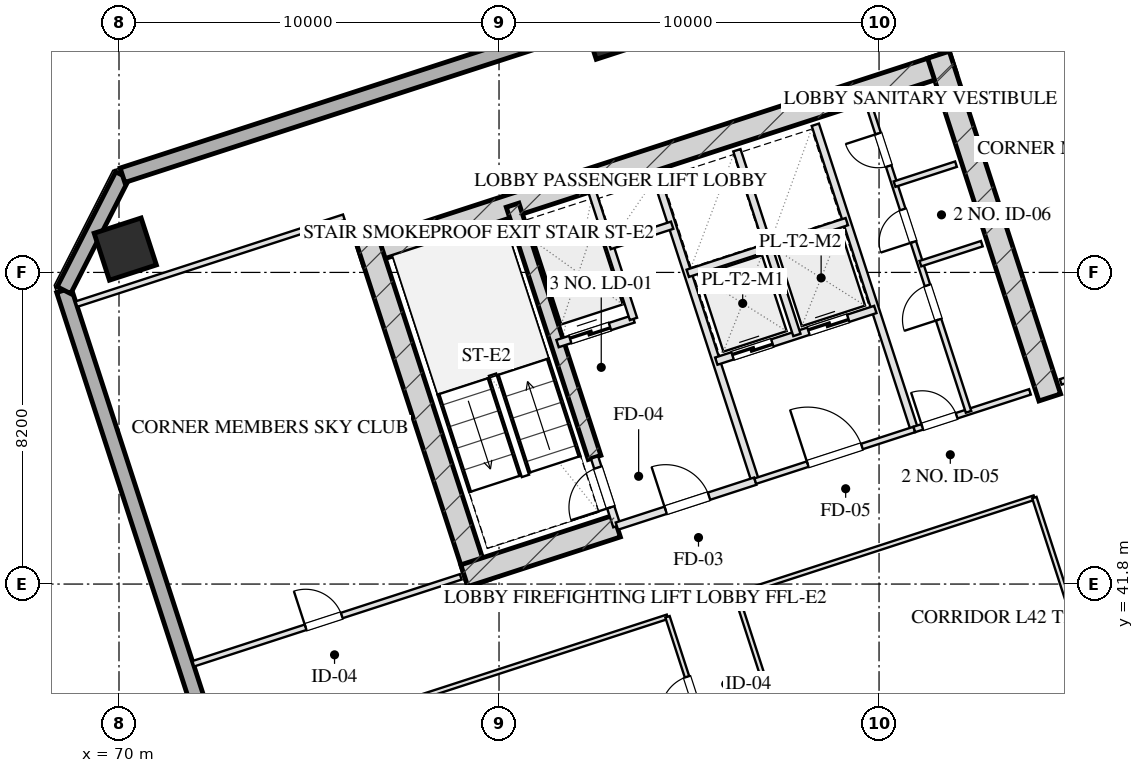
"""IFC4 building model, lengths in metres.
Left out: names, types, materials, properties, quantities, classifications, styles, units other than length and angle.
Written with IfcOpenShell. Run it as: python <this file> out.ifc"""

import sys

from ifc_helpers import new_model, si_unit, direction, frame, frame_2d, origin, origin_2d, place, context, subcontext, project, spatial, rectangle, hollow_rectangle, extrude, element, fill, save


model = new_model("IFC4")
c1 = context("Model", 3, precision=1e-05, world=origin(), true_north=direction((0.0, 1.0)))
c2 = subcontext(c1, "Body", "Model", "MODEL_VIEW")
j1 = project(units=[si_unit("LENGTHUNIT", "METRE"), si_unit("PLANEANGLEUNIT", "RADIAN")], contexts=[c1])
p1 = place(None, origin())
s1 = spatial("IfcSite", under=j1, at=p1, CompositionType="ELEMENT")
p2 = place(p1, origin())
s2 = spatial("IfcBuilding", under=s1, at=p2, CompositionType="ELEMENT")
p3 = place(p2, frame((0.0, 0.0, 159.85)))
s3 = spatial("IfcBuildingStorey", under=s2, at=p3, CompositionType="ELEMENT", Elevation=159.85)
p4 = place(p3, frame((76.344, 50.466, 0.0), z_axis=(0.0, 0.0, 1.0), x_axis=(0.951055727519, 0.309019421968, 0.0)))
e1 = element("IfcWall", 1, at=p4, inside=s3, PredefinedType="SHEAR", context=c2, shape_type="SweptSolid", body=[
    extrude(rectangle(XDim=16.4, YDim=0.6, at=frame_2d((8.2, 0.0))), origin(), (0.0, 0.0, 1.0), 3.45),
])
for number, where, z_axis, x_axis in (
    (2, (79.466, 41.828, 0.0), (0.0, 0.0, 1.0), (-0.309, 0.951, 0.0)),
    (3, (94.492, 46.71, 0.0), (0.0, 0.0, 1.0), (-0.309, 0.951, 0.0)),
):
    element("IfcWall", number, at=place(p3, frame(where, z_axis=z_axis, x_axis=x_axis)), inside=s3, PredefinedType="SHEAR", context=c2, shape_type="SweptSolid", body=[
        extrude(rectangle(XDim=9.48, YDim=0.6, at=frame_2d((4.74, 0.0))), origin(), (0.0, 0.0, 1.0), 3.45),
    ])
p5 = place(p3, frame((82.514, 45.131, 0.0), z_axis=(0.0, 0.0, 1.0), x_axis=(-0.308988790936, 0.951065679686, 0.0)))
e4 = element("IfcWall", 4, at=p5, inside=s3, PredefinedType="SHEAR", context=c2, shape_type="SweptSolid", body=[
    extrude(rectangle(XDim=6.98, YDim=0.35, at=frame_2d((3.49, 0.0))), origin(), (0.0, 0.0, 1.0), 3.45),
])
p6 = place(p3, frame((79.087, 42.021, 0.0), z_axis=(0.0, 0.0, 1.0), x_axis=(0.951062550203, 0.3089984233, 0.0)))
e5 = element("IfcWall", 5, at=p6, inside=s3, PredefinedType="SHEAR", context=c2, shape_type="SweptSolid", body=[
    extrude(rectangle(XDim=4.22, YDim=0.6, at=frame_2d((2.11, 0.0))), origin(), (0.0, 0.0, 1.0), 3.45),
])
p7 = place(p3, frame((70.165, 50.614, 0.0), z_axis=(0.0, 0.0, 1.0), x_axis=(0.951056516295, 0.309016994375, 0.0)))
e6 = element("IfcColumn", 6, at=p7, inside=s3, PredefinedType="COLUMN", context=c2, shape_type="SweptSolid", body=[
    extrude(hollow_rectangle(XDim=1.3, YDim=1.3, WallThickness=0.045, at=origin_2d()), origin(), (0.0, 0.0, 1.0), 3.451),
])
p8 = place(p3, frame((82.815, 56.112, 0.0), z_axis=(0.0, 0.0, 1.0), x_axis=(0.951056516295, 0.309016994375, 0.0)))
e7 = element("IfcColumn", 7, at=p8, inside=s3, PredefinedType="COLUMN", context=c2, shape_type="SweptSolid", body=[
    extrude(hollow_rectangle(XDim=0.8, YDim=0.8, WallThickness=0.028, at=origin_2d()), origin(), (0.0, 0.0, 1.0), 3.451),
])
p9 = place(p3, frame((81.776, 8.827, 0.0), z_axis=(0.0, 0.0, 1.0), x_axis=(-0.309014228706, 0.951057414911, 0.0)))
e8 = element("IfcWall", 8, at=p9, inside=s3, PredefinedType="SOLIDWALL", context=c2, shape_type="SweptSolid", body=[
    extrude(rectangle(XDim=42.8, YDim=0.4, at=frame_2d((21.4, 0.0))), origin(), (0.0, 0.0, 1.0), 2.61),
])
p10 = place(p9, frame((13.875, 0.0, 0.75)))
e9 = element("IfcOpeningElement", 9, at=p10, cuts=e8, PredefinedType="OPENING", context=c2, shape_type="SweptSolid", body=[
    extrude(rectangle(XDim=2.25, YDim=1.46, at=frame_2d((1.125, 0.73))), frame((0.0, 0.21, 0.0), z_axis=(0.0, -1.0, 0.0), x_axis=(1.0, 0.0, 0.0)), (0.0, 0.0, 1.0), 0.42),
])
p11 = place(p9, frame((26.675, 0.0, 0.75)))
e10 = element("IfcOpeningElement", 10, at=p11, cuts=e8, PredefinedType="OPENING", context=c2, shape_type="SweptSolid", body=[
    extrude(rectangle(XDim=2.25, YDim=1.46, at=frame_2d((1.125, 0.73))), frame((0.0, 0.21, 0.0), z_axis=(0.0, -1.0, 0.0), x_axis=(1.0, 0.0, 0.0)), (0.0, 0.0, 1.0), 0.42),
])
p12 = place(p3, frame((68.551, 49.532, 0.0), z_axis=(0.0, 0.0, 1.0), x_axis=(0.454019523198, 0.890991735402, 0.0)))
e11 = element("IfcWall", 11, at=p12, inside=s3, PredefinedType="SOLIDWALL", context=c2, shape_type="SweptSolid", body=[
    extrude(rectangle(XDim=3.394, YDim=0.4, at=frame_2d((1.697, 0.0))), origin(), (0.0, 0.0, 1.0), 2.61),
])
p13 = place(p3, frame((70.092, 52.556, 0.0), z_axis=(0.0, 0.0, 1.0), x_axis=(0.951057580055, 0.30901372044, 0.0)))
e12 = element("IfcWall", 12, at=p13, inside=s3, PredefinedType="SOLIDWALL", context=c2, shape_type="SweptSolid", body=[
    extrude(rectangle(XDim=26.4, YDim=0.4, at=frame_2d((13.2, 0.0))), origin(), (0.0, 0.0, 1.0), 2.61),
])
p14 = place(p3, frame((83.101, 43.324, 0.0), z_axis=(0.0, 0.0, 1.0), x_axis=(-0.309048298632, 0.951046344356, 0.0)))
e13 = element("IfcWall", 13, at=p14, inside=s3, PredefinedType="PARTITIONING", context=c2, shape_type="SweptSolid", body=[
    extrude(rectangle(XDim=1.9, YDim=0.2, at=frame_2d((0.95, 0.0))), origin(), (0.0, 0.0, 1.0), 3.175),
])
p15 = place(p14, frame((0.52, 0.0, 0.0)))
e14 = element("IfcOpeningElement", 14, at=p15, cuts=e13, PredefinedType="OPENING", context=c2, shape_type="SweptSolid", body=[
    extrude(rectangle(XDim=1.1, YDim=2.05, at=frame_2d((0.55, 1.025))), frame((0.0, 0.11, 0.0), z_axis=(0.0, -1.0, 0.0), x_axis=(1.0, 0.0, 0.0)), (0.0, 0.0, 1.0), 0.22),
])
p16 = place(p3, frame((86.743, 44.508, 0.0), z_axis=(0.0, 0.0, 1.0), x_axis=(-0.309016001439, 0.951056838919, 0.0)))
e15 = element("IfcWall", 15, at=p16, inside=s3, PredefinedType="PARTITIONING", context=c2, shape_type="SweptSolid", body=[
    extrude(rectangle(XDim=8.43, YDim=0.2, at=frame_2d((4.215, 0.0))), origin(), (0.0, 0.0, 1.0), 3.175),
])
p17 = place(p3, frame((83.101, 43.324, 0.0), z_axis=(0.0, 0.0, 1.0), x_axis=(0.951052804469, 0.309028417967, 0.0)))
e16 = element("IfcWall", 16, at=p17, inside=s3, PredefinedType="PARTITIONING", context=c2, shape_type="SweptSolid", body=[
    extrude(rectangle(XDim=3.83, YDim=0.2, at=frame_2d((1.915, 0.0))), origin(), (0.0, 0.0, 1.0), 3.175),
])
p18 = place(p17, frame((1.35, 0.0, 0.0)))
e17 = element("IfcOpeningElement", 17, at=p18, cuts=e16, PredefinedType="OPENING", context=c2, shape_type="SweptSolid", body=[
    extrude(rectangle(XDim=1.2, YDim=2.05, at=frame_2d((0.6, 1.025))), frame((0.0, 0.11, 0.0), z_axis=(0.0, -1.0, 0.0), x_axis=(1.0, 0.0, 0.0)), (0.0, 0.0, 1.0), 0.22),
])
p19 = place(p3, frame((81.54, 48.127, 0.0), z_axis=(0.0, 0.0, 1.0), x_axis=(0.951062257173, 0.308999325213, 0.0)))
e18 = element("IfcWall", 18, at=p19, inside=s3, PredefinedType="PARTITIONING", context=c2, shape_type="SweptSolid", body=[
    extrude(rectangle(XDim=2.1, YDim=0.2, at=frame_2d((1.05, 0.0))), origin(), (0.0, 0.0, 1.0), 3.175),
])
p20 = place(p19, frame((0.35, 0.0, 0.0)))
e19 = element("IfcOpeningElement", 19, at=p20, cuts=e18, PredefinedType="OPENING", context=c2, shape_type="SweptSolid", body=[
    extrude(rectangle(XDim=1.1, YDim=2.05, at=frame_2d((0.55, 1.025))), frame((0.0, 0.11, 0.0), z_axis=(0.0, -1.0, 0.0), x_axis=(1.0, 0.0, 0.0)), (0.0, 0.0, 1.0), 0.22),
])
p21 = place(p3, frame((83.538, 48.776, 0.0), z_axis=(0.0, 0.0, 1.0), x_axis=(-0.3089935693, 0.951064127245, 0.0)))
e20 = element("IfcWall", 20, at=p21, inside=s3, PredefinedType="PARTITIONING", context=c2, shape_type="SweptSolid", body=[
    extrude(rectangle(XDim=3.7, YDim=0.2, at=frame_2d((1.85, 0.0))), origin(), (0.0, 0.0, 1.0), 3.175),
])
p22 = place(p3, frame((82.91, 50.707, 0.0), z_axis=(0.0, 0.0, 1.0), x_axis=(0.951041328149, 0.309063734775, 0.0)))
e21 = element("IfcWall", 21, at=p22, inside=s3, PredefinedType="PARTITIONING", context=c2, shape_type="SweptSolid", body=[
    extrude(rectangle(XDim=1.73, YDim=0.2, at=frame_2d((0.865, 0.0))), origin(), (0.0, 0.0, 1.0), 3.175),
])
p23 = place(p3, frame((90.928, 45.868, 0.0), z_axis=(0.0, 0.0, 1.0), x_axis=(-0.309042196757, 0.951048327176, 0.0)))
e22 = element("IfcWall", 22, at=p23, inside=s3, PredefinedType="PARTITIONING", context=c2, shape_type="SweptSolid", body=[
    extrude(rectangle(XDim=8.43, YDim=0.2, at=frame_2d((4.215, 0.0))), origin(), (0.0, 0.0, 1.0), 3.175),
])
p24 = place(p3, frame((86.743, 44.508, 0.0), z_axis=(0.0, 0.0, 1.0), x_axis=(0.951063829732, 0.308994485023, 0.0)))
e23 = element("IfcWall", 23, at=p24, inside=s3, PredefinedType="PARTITIONING", context=c2, shape_type="SweptSolid", body=[
    extrude(rectangle(XDim=4.4, YDim=0.15, at=frame_2d((2.2, 0.0))), origin(), (0.0, 0.0, 1.0), 3.175),
])
p25 = place(p24, frame((1.45, 0.0, 0.0)))
e24 = element("IfcOpeningElement", 24, at=p25, cuts=e23, PredefinedType="OPENING", context=c2, shape_type="SweptSolid", body=[
    extrude(rectangle(XDim=1.5, YDim=2.05, at=frame_2d((0.75, 1.025))), frame((0.0, 0.085, 0.0), z_axis=(0.0, -1.0, 0.0), x_axis=(1.0, 0.0, 0.0)), (0.0, 0.0, 1.0), 0.17),
])
p26 = place(p3, frame((85.718, 47.666, 0.0), z_axis=(0.0, 0.0, 1.0), x_axis=(0.951058531764, 0.30901079133, 0.0)))
e25 = element("IfcWall", 25, at=p26, inside=s3, PredefinedType="PARTITIONING", context=c2, shape_type="SweptSolid", body=[
    extrude(rectangle(XDim=4.4, YDim=0.2, at=frame_2d((2.2, 0.0))), origin(), (0.0, 0.0, 1.0), 3.175),
])
p27 = place(p26, frame((0.45, 0.0, 0.0)))
e26 = element("IfcOpeningElement", 26, at=p27, cuts=e25, PredefinedType="OPENING", context=c2, shape_type="SweptSolid", body=[
    extrude(rectangle(XDim=1.1, YDim=2.05, at=frame_2d((0.55, 1.025))), frame((0.0, 0.11, 0.0), z_axis=(0.0, -1.0, 0.0), x_axis=(1.0, 0.0, 0.0)), (0.0, 0.0, 1.0), 0.22),
])
p28 = place(p26, frame((2.55, 0.0, 0.0)))
e27 = element("IfcOpeningElement", 27, at=p28, cuts=e25, PredefinedType="OPENING", context=c2, shape_type="SweptSolid", body=[
    extrude(rectangle(XDim=1.1, YDim=2.05, at=frame_2d((0.55, 1.025))), frame((0.0, 0.11, 0.0), z_axis=(0.0, -1.0, 0.0), x_axis=(1.0, 0.0, 0.0)), (0.0, 0.0, 1.0), 0.22),
])
p29 = place(p3, frame((87.838, 48.354, 0.0), z_axis=(0.0, 0.0, 1.0), x_axis=(-0.3090093719, 0.951058992953, 0.0)))
e28 = element("IfcWall", 28, at=p29, inside=s3, PredefinedType="PARTITIONING", context=c2, shape_type="SweptSolid", body=[
    extrude(rectangle(XDim=5.11, YDim=0.2, at=frame_2d((2.555, 0.0))), origin(), (0.0, 0.0, 1.0), 3.175),
])
p30 = place(p3, frame((84.967, 49.977, 0.0), z_axis=(0.0, 0.0, 1.0), x_axis=(0.951063829732, 0.308994485023, 0.0)))
e29 = element("IfcWall", 29, at=p30, inside=s3, PredefinedType="PARTITIONING", context=c2, shape_type="SweptSolid", body=[
    extrude(rectangle(XDim=4.4, YDim=0.2, at=frame_2d((2.2, 0.0))), origin(), (0.0, 0.0, 1.0), 3.175),
])
p31 = place(p3, frame((90.928, 45.868, 0.0), z_axis=(0.0, 0.0, 1.0), x_axis=(0.951059297078, 0.309008435874, 0.0)))
e30 = element("IfcWall", 30, at=p31, inside=s3, PredefinedType="PARTITIONING", context=c2, shape_type="SweptSolid", body=[
    extrude(rectangle(XDim=3.2, YDim=0.15, at=frame_2d((1.6, 0.0))), origin(), (0.0, 0.0, 1.0), 3.175),
])
p32 = place(p31, frame((0.22, 0.0, 0.0)))
e31 = element("IfcOpeningElement", 31, at=p32, cuts=e30, PredefinedType="OPENING", context=c2, shape_type="SweptSolid", body=[
    extrude(rectangle(XDim=0.95, YDim=2.05, at=frame_2d((0.475, 1.025))), frame((0.0, 0.085, 0.0), z_axis=(0.0, -1.0, 0.0), x_axis=(1.0, 0.0, 0.0)), (0.0, 0.0, 1.0), 0.17),
])
p33 = place(p3, frame((92.355, 46.331, 0.0), z_axis=(0.0, 0.0, 1.0), x_axis=(-0.309007490203, 0.951059604335, 0.0)))
e32 = element("IfcWall", 32, at=p33, inside=s3, PredefinedType="PARTITIONING", context=c2, shape_type="SweptSolid", body=[
    extrude(rectangle(XDim=8.43, YDim=0.15, at=frame_2d((4.215, 0.0))), origin(), (0.0, 0.0, 1.0), 3.175),
])
p34 = place(p33, frame((2.55, 0.0, 0.0)))
e33 = element("IfcOpeningElement", 33, at=p34, cuts=e32, PredefinedType="OPENING", context=c2, shape_type="SweptSolid", body=[
    extrude(rectangle(XDim=0.95, YDim=2.05, at=frame_2d((0.475, 1.025))), frame((0.0, 0.085, 0.0), z_axis=(0.0, -1.0, 0.0), x_axis=(1.0, 0.0, 0.0)), (0.0, 0.0, 1.0), 0.17),
])
p35 = place(p33, frame((4.7, 0.0, 0.0)))
e34 = element("IfcOpeningElement", 34, at=p35, cuts=e32, PredefinedType="OPENING", context=c2, shape_type="SweptSolid", body=[
    extrude(rectangle(XDim=0.9, YDim=2.05, at=frame_2d((0.45, 1.025))), frame((0.0, 0.085, 0.0), z_axis=(0.0, -1.0, 0.0), x_axis=(1.0, 0.0, 0.0)), (0.0, 0.0, 1.0), 0.17),
])
p36 = place(p33, frame((6.8, 0.0, 0.0)))
e35 = element("IfcOpeningElement", 35, at=p36, cuts=e32, PredefinedType="OPENING", context=c2, shape_type="SweptSolid", body=[
    extrude(rectangle(XDim=0.9, YDim=2.05, at=frame_2d((0.45, 1.025))), frame((0.0, 0.085, 0.0), z_axis=(0.0, -1.0, 0.0), x_axis=(1.0, 0.0, 0.0)), (0.0, 0.0, 1.0), 0.17),
])
p37 = place(p3, frame((91.088, 50.23, 0.0), z_axis=(0.0, 0.0, 1.0), x_axis=(0.951054116971, 0.309024378638, 0.0)))
e36 = element("IfcWall", 36, at=p37, inside=s3, PredefinedType="PARTITIONING", context=c2, shape_type="SweptSolid", body=[
    extrude(rectangle(XDim=1.7, YDim=0.15, at=frame_2d((0.85, 0.0))), origin(), (0.0, 0.0, 1.0), 3.175),
])
p38 = place(p3, frame((90.408, 52.323, 0.0), z_axis=(0.0, 0.0, 1.0), x_axis=(0.951040401051, 0.309066587596, 0.0)))
e37 = element("IfcWall", 37, at=p38, inside=s3, PredefinedType="PARTITIONING", context=c2, shape_type="SweptSolid", body=[
    extrude(rectangle(XDim=1.7, YDim=0.15, at=frame_2d((0.85, 0.0))), origin(), (0.0, 0.0, 1.0), 3.175),
])
p39 = place(p3, frame((68.88, 49.166, 0.0), z_axis=(0.0, 0.0, 1.0), x_axis=(0.951060977215, 0.309003264738, 0.0)))
e38 = element("IfcWall", 38, at=p39, inside=s3, PredefinedType="PARTITIONING", context=c2, shape_type="SweptSolid", body=[
    extrude(rectangle(XDim=7.4, YDim=0.15, at=frame_2d((3.7, 0.0))), origin(), (0.0, 0.0, 1.0), 3.175),
])
p40 = place(p3, frame((71.955, 39.703, 0.0), z_axis=(0.0, 0.0, 1.0), x_axis=(0.951060977215, 0.309003264738, 0.0)))
e39 = element("IfcWall", 39, at=p40, inside=s3, PredefinedType="PARTITIONING", context=c2, shape_type="SweptSolid", body=[
    extrude(rectangle(XDim=7.4, YDim=0.15, at=frame_2d((3.7, 0.0))), origin(), (0.0, 0.0, 1.0), 3.175),
])
p41 = place(p40, frame((3.108, 0.0, 0.0)))
e40 = element("IfcOpeningElement", 40, at=p41, cuts=e39, PredefinedType="OPENING", context=c2, shape_type="SweptSolid", body=[
    extrude(rectangle(XDim=1.0, YDim=2.05, at=frame_2d((0.5, 1.025))), frame((0.0, 0.085, 0.0), z_axis=(0.0, -1.0, 0.0), x_axis=(1.0, 0.0, 0.0)), (0.0, 0.0, 1.0), 0.17),
])
p42 = place(p3, frame((94.78, 47.119, 0.0), z_axis=(0.0, 0.0, 1.0), x_axis=(0.951057811516, 0.309013008068, 0.0)))
e41 = element("IfcWall", 41, at=p42, inside=s3, PredefinedType="PARTITIONING", context=c2, shape_type="SweptSolid", body=[
    extrude(rectangle(XDim=6.8, YDim=0.15, at=frame_2d((3.4, 0.0))), origin(), (0.0, 0.0, 1.0), 3.175),
])
p43 = place(p42, frame((2.856, 0.0, 0.0)))
e42 = element("IfcOpeningElement", 42, at=p43, cuts=e41, PredefinedType="OPENING", context=c2, shape_type="SweptSolid", body=[
    extrude(rectangle(XDim=1.0, YDim=2.05, at=frame_2d((0.5, 1.025))), frame((0.0, 0.085, 0.0), z_axis=(0.0, -1.0, 0.0), x_axis=(1.0, 0.0, 0.0)), (0.0, 0.0, 1.0), 0.17),
])
p44 = place(p3, frame((72.783, 37.154, 0.0), z_axis=(0.0, 0.0, 1.0), x_axis=(0.9510516424, 0.30903199428, 0.0)))
e43 = element("IfcWall", 43, at=p44, inside=s3, PredefinedType="PARTITIONING", context=c2, shape_type="SweptSolid", body=[
    extrude(rectangle(XDim=12.25, YDim=0.12, at=frame_2d((6.125, 0.0))), origin(), (0.0, 0.0, 1.0), 3.175),
])
p45 = place(p3, frame((86.24, 41.527, 0.0), z_axis=(0.0, 0.0, 1.0), x_axis=(0.951058857521, 0.309009788731, 0.0)))
e44 = element("IfcWall", 44, at=p45, inside=s3, PredefinedType="PARTITIONING", context=c2, shape_type="SweptSolid", body=[
    extrude(rectangle(XDim=8.25, YDim=0.12, at=frame_2d((4.125, 0.0))), origin(), (0.0, 0.0, 1.0), 3.175),
])
p46 = place(p3, frame((89.575, 25.114, 0.0), z_axis=(0.0, 0.0, 1.0), x_axis=(-0.30901773025, 0.951056277195, 0.0)))
e45 = element("IfcWall", 45, at=p46, inside=s3, PredefinedType="PARTITIONING", context=c2, shape_type="SweptSolid", body=[
    extrude(rectangle(XDim=16.64, YDim=0.12, at=frame_2d((8.32, 0.0))), origin(), (0.0, 0.0, 1.0), 3.175),
])
p47 = place(p46, frame((1.66, 0.0, 0.0)))
e46 = element("IfcOpeningElement", 46, at=p47, cuts=e45, PredefinedType="OPENING", context=c2, shape_type="SweptSolid", body=[
    extrude(rectangle(XDim=1.0, YDim=2.05, at=frame_2d((0.5, 1.025))), frame((0.0, 0.07, 0.0), z_axis=(0.0, -1.0, 0.0), x_axis=(1.0, 0.0, 0.0)), (0.0, 0.0, 1.0), 0.14),
])
p48 = place(p46, frame((7.82, 0.0, 0.0)))
e47 = element("IfcOpeningElement", 47, at=p48, cuts=e45, PredefinedType="OPENING", context=c2, shape_type="SweptSolid", body=[
    extrude(rectangle(XDim=1.0, YDim=2.05, at=frame_2d((0.5, 1.025))), frame((0.0, 0.07, 0.0), z_axis=(0.0, -1.0, 0.0), x_axis=(1.0, 0.0, 0.0)), (0.0, 0.0, 1.0), 0.14),
])
p49 = place(p46, frame((13.98, 0.0, 0.0)))
e48 = element("IfcOpeningElement", 48, at=p49, cuts=e45, PredefinedType="OPENING", context=c2, shape_type="SweptSolid", body=[
    extrude(rectangle(XDim=1.0, YDim=2.05, at=frame_2d((0.5, 1.025))), frame((0.0, 0.07, 0.0), z_axis=(0.0, -1.0, 0.0), x_axis=(1.0, 0.0, 0.0)), (0.0, 0.0, 1.0), 0.14),
])
p50 = place(p3, frame((91.382, 25.701, 0.0), z_axis=(0.0, 0.0, 1.0), x_axis=(-0.309004459387, 0.951060589068, 0.0)))
e49 = element("IfcWall", 49, at=p50, inside=s3, PredefinedType="PARTITIONING", context=c2, shape_type="SweptSolid", body=[
    extrude(rectangle(XDim=16.64, YDim=0.12, at=frame_2d((8.32, 0.0))), origin(), (0.0, 0.0, 1.0), 3.175),
])
p51 = place(p50, frame((7.987, 0.0, 0.0)))
e50 = element("IfcOpeningElement", 50, at=p51, cuts=e49, PredefinedType="OPENING", context=c2, shape_type="SweptSolid", body=[
    extrude(rectangle(XDim=1.1, YDim=2.05, at=frame_2d((0.55, 1.025))), frame((0.0, 0.07, 0.0), z_axis=(0.0, -1.0, 0.0), x_axis=(1.0, 0.0, 0.0)), (0.0, 0.0, 1.0), 0.14),
])
p52 = place(p3, frame((99.229, 28.25, 0.0), z_axis=(0.0, 0.0, 1.0), x_axis=(-0.30901773025, 0.951056277195, 0.0)))
e51 = element("IfcWall", 51, at=p52, inside=s3, PredefinedType="PARTITIONING", context=c2, shape_type="SweptSolid", body=[
    extrude(rectangle(XDim=16.64, YDim=0.12, at=frame_2d((8.32, 0.0))), origin(), (0.0, 0.0, 1.0), 3.175),
])
p53 = place(p15, origin())
e52 = element("IfcDoor", 52, at=p53, inside=s3, OperationType="SINGLE_SWING_LEFT", PredefinedType="DOOR", context=c2, shape_type="SweptSolid", body=[
    extrude(rectangle(XDim=1.1, YDim=2.05, at=frame_2d((0.55, 1.025))), frame((0.0, 0.025, 0.0), z_axis=(0.0, -1.0, 0.0), x_axis=(1.0, 0.0, 0.0)), (0.0, 0.0, 1.0), 0.05),
])
fill(e14, e52)
p54 = place(p18, origin())
e53 = element("IfcDoor", 53, at=p54, inside=s3, OperationType="SINGLE_SWING_LEFT", PredefinedType="DOOR", context=c2, shape_type="SweptSolid", body=[
    extrude(rectangle(XDim=1.2, YDim=2.05, at=frame_2d((0.6, 1.025))), frame((0.0, 0.025, 0.0), z_axis=(0.0, -1.0, 0.0), x_axis=(1.0, 0.0, 0.0)), (0.0, 0.0, 1.0), 0.05),
])
fill(e17, e53)
p55 = place(p20, origin())
e54 = element("IfcDoor", 54, at=p55, inside=s3, OperationType="DOUBLE_DOOR_SLIDING", PredefinedType="DOOR", context=c2, shape_type="SweptSolid", body=[
    extrude(rectangle(XDim=1.1, YDim=2.05, at=frame_2d((0.55, 1.025))), frame((0.0, 0.025, 0.0), z_axis=(0.0, -1.0, 0.0), x_axis=(1.0, 0.0, 0.0)), (0.0, 0.0, 1.0), 0.05),
])
fill(e19, e54)
p56 = place(p25, origin())
e55 = element("IfcDoor", 55, at=p56, inside=s3, OperationType="SINGLE_SWING_LEFT", PredefinedType="DOOR", context=c2, shape_type="SweptSolid", body=[
    extrude(rectangle(XDim=1.5, YDim=2.05, at=frame_2d((0.75, 1.025))), frame((0.0, 0.025, 0.0), z_axis=(0.0, -1.0, 0.0), x_axis=(1.0, 0.0, 0.0)), (0.0, 0.0, 1.0), 0.05),
])
fill(e24, e55)
p57 = place(p27, origin())
e56 = element("IfcDoor", 56, at=p57, inside=s3, OperationType="DOUBLE_DOOR_SLIDING", PredefinedType="DOOR", context=c2, shape_type="SweptSolid", body=[
    extrude(rectangle(XDim=1.1, YDim=2.05, at=frame_2d((0.55, 1.025))), frame((0.0, 0.025, 0.0), z_axis=(0.0, -1.0, 0.0), x_axis=(1.0, 0.0, 0.0)), (0.0, 0.0, 1.0), 0.05),
])
fill(e26, e56)
p58 = place(p28, origin())
e57 = element("IfcDoor", 57, at=p58, inside=s3, OperationType="DOUBLE_DOOR_SLIDING", PredefinedType="DOOR", context=c2, shape_type="SweptSolid", body=[
    extrude(rectangle(XDim=1.1, YDim=2.05, at=frame_2d((0.55, 1.025))), frame((0.0, 0.025, 0.0), z_axis=(0.0, -1.0, 0.0), x_axis=(1.0, 0.0, 0.0)), (0.0, 0.0, 1.0), 0.05),
])
fill(e27, e57)
p59 = place(p32, origin())
e58 = element("IfcDoor", 58, at=p59, inside=s3, OperationType="SINGLE_SWING_LEFT", PredefinedType="DOOR", context=c2, shape_type="SweptSolid", body=[
    extrude(rectangle(XDim=0.95, YDim=2.05, at=frame_2d((0.475, 1.025))), frame((0.0, 0.025, 0.0), z_axis=(0.0, -1.0, 0.0), x_axis=(1.0, 0.0, 0.0)), (0.0, 0.0, 1.0), 0.05),
])
fill(e31, e58)
p60 = place(p34, origin())
e59 = element("IfcDoor", 59, at=p60, inside=s3, OperationType="SINGLE_SWING_LEFT", PredefinedType="DOOR", context=c2, shape_type="SweptSolid", body=[
    extrude(rectangle(XDim=0.95, YDim=2.05, at=frame_2d((0.475, 1.025))), frame((0.0, 0.025, 0.0), z_axis=(0.0, -1.0, 0.0), x_axis=(1.0, 0.0, 0.0)), (0.0, 0.0, 1.0), 0.05),
])
fill(e33, e59)
p61 = place(p35, origin())
e60 = element("IfcDoor", 60, at=p61, inside=s3, OperationType="SINGLE_SWING_LEFT", PredefinedType="DOOR", context=c2, shape_type="SweptSolid", body=[
    extrude(rectangle(XDim=0.9, YDim=2.05, at=frame_2d((0.45, 1.025))), frame((0.0, 0.025, 0.0), z_axis=(0.0, -1.0, 0.0), x_axis=(1.0, 0.0, 0.0)), (0.0, 0.0, 1.0), 0.05),
])
fill(e34, e60)
p62 = place(p36, origin())
e61 = element("IfcDoor", 61, at=p62, inside=s3, OperationType="SINGLE_SWING_RIGHT", PredefinedType="DOOR", context=c2, shape_type="SweptSolid", body=[
    extrude(rectangle(XDim=0.9, YDim=2.05, at=frame_2d((0.45, 1.025))), frame((0.0, 0.025, 0.0), z_axis=(0.0, -1.0, 0.0), x_axis=(1.0, 0.0, 0.0)), (0.0, 0.0, 1.0), 0.05),
])
fill(e35, e61)
p63 = place(p41, origin())
e62 = element("IfcDoor", 62, at=p63, inside=s3, OperationType="SINGLE_SWING_LEFT", PredefinedType="DOOR", context=c2, shape_type="SweptSolid", body=[
    extrude(rectangle(XDim=1.0, YDim=2.05, at=frame_2d((0.5, 1.025))), frame((0.0, 0.025, 0.0), z_axis=(0.0, -1.0, 0.0), x_axis=(1.0, 0.0, 0.0)), (0.0, 0.0, 1.0), 0.05),
])
fill(e40, e62)
p64 = place(p49, origin())
e63 = element("IfcDoor", 63, at=p64, inside=s3, OperationType="SINGLE_SWING_LEFT", PredefinedType="DOOR", context=c2, shape_type="SweptSolid", body=[
    extrude(rectangle(XDim=1.0, YDim=2.05, at=frame_2d((0.5, 1.025))), frame((0.0, 0.025, 0.0), z_axis=(0.0, -1.0, 0.0), x_axis=(1.0, 0.0, 0.0)), (0.0, 0.0, 1.0), 0.05),
])
fill(e48, e63)
save(model, sys.argv[1])
